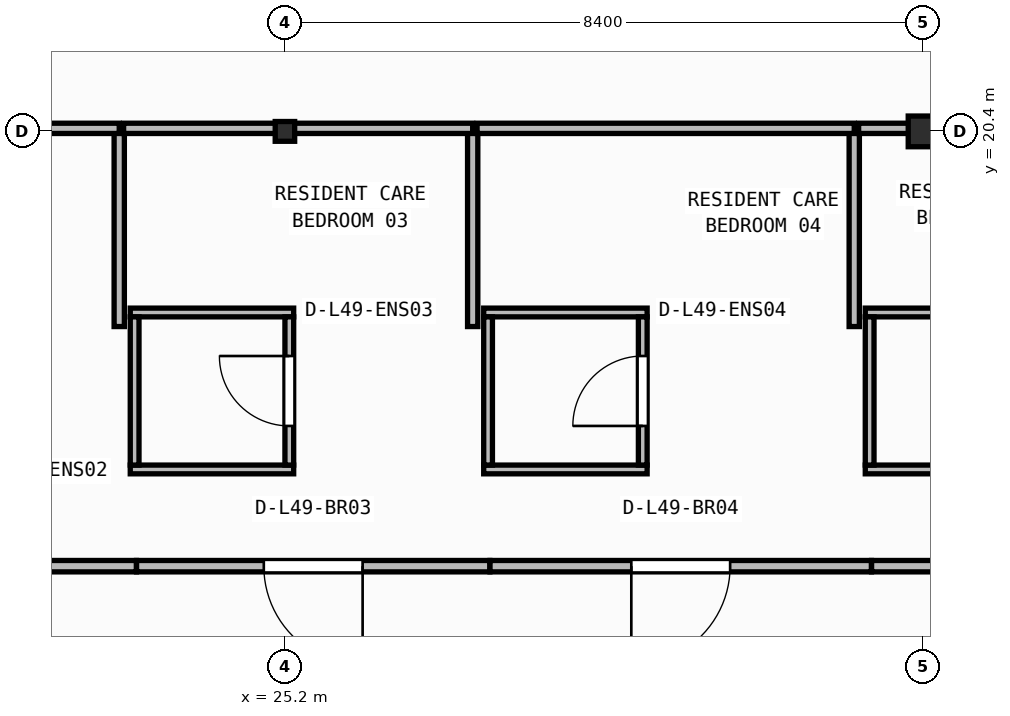
"""IFC4 building model, lengths in metres.
Left out: names, types, materials, properties, quantities, classifications, styles, units other than length and angle.
Written with IfcOpenShell. Run it as: python <this file> out.ifc"""

import sys

from ifc_helpers import new_model, si_unit, direction, frame, frame_2d, origin, origin_2d, place, context, subcontext, project, spatial, rectangle, i_section, extrude, element, fill, save


model = new_model("IFC4")
c1 = context("Model", 3, precision=1e-05, world=origin(), true_north=direction((0.0, 1.0)))
c2 = subcontext(c1, "Body", "Model", "MODEL_VIEW")
j1 = project(units=[si_unit("LENGTHUNIT", "METRE"), si_unit("PLANEANGLEUNIT", "RADIAN")], contexts=[c1])
p1 = place(None, origin())
s1 = spatial("IfcSite", under=j1, at=p1, CompositionType="ELEMENT")
p2 = place(p1, origin())
s2 = spatial("IfcBuilding", under=s1, at=p2, CompositionType="ELEMENT")
p3 = place(p2, frame((0.0, 0.0, 200.0)))
s3 = spatial("IfcBuildingStorey", under=s2, at=p3, CompositionType="ELEMENT", Elevation=200.0)
p4 = place(p3, frame((25.2, 20.4, 0.0), z_axis=(0.0, 0.0, 1.0), x_axis=(1.0, 0.0, 0.0)))
e1 = element("IfcColumn", 1, at=p4, inside=s3, PredefinedType="COLUMN", context=c2, shape_type="SweptSolid", body=[
    extrude(i_section(OverallWidth=0.256, OverallDepth=0.26, WebThickness=0.01, FlangeThickness=0.017, FilletRadius=0.013, at=origin_2d()), origin(), (0.0, 0.0, 1.0), 3.95),
])
p5 = place(p3, frame((33.6, 20.4, 0.0), z_axis=(0.0, 0.0, 1.0), x_axis=(1.0, 0.0, 0.0)))
e2 = element("IfcColumn", 2, at=p5, inside=s3, PredefinedType="COLUMN", context=c2, shape_type="SweptSolid", body=[
    extrude(i_section(OverallWidth=0.4, OverallDepth=0.404, WebThickness=0.02, FlangeThickness=0.032, at=origin_2d()), origin(), (0.0, 0.0, 1.0), 3.95),
])
p6 = place(p3, frame((23.165, 15.952, 0.0), z_axis=(0.0, 0.0, 1.0), x_axis=(1.0, 0.0, 0.0)))
e3 = element("IfcWall", 3, at=p6, inside=s3, PredefinedType="PARTITIONING", context=c2, shape_type="SweptSolid", body=[
    extrude(rectangle(XDim=2.15, YDim=0.115, at=frame_2d((1.075, 0.0))), origin(), (0.0, 0.0, 1.0), 3.429),
])
p7 = place(p3, frame((23.165, 18.018, 0.0), z_axis=(0.0, 0.0, 1.0), x_axis=(1.0, 0.0, 0.0)))
e4 = element("IfcWall", 4, at=p7, inside=s3, PredefinedType="PARTITIONING", context=c2, shape_type="SweptSolid", body=[
    extrude(rectangle(XDim=2.15, YDim=0.115, at=frame_2d((1.075, 0.0))), origin(), (0.0, 0.0, 1.0), 3.71),
])
p8 = place(p3, frame((23.222, 16.01, 0.0), z_axis=(0.0, 0.0, 1.0), x_axis=(0.0, 1.0, 0.0)))
e5 = element("IfcWall", 5, at=p8, inside=s3, PredefinedType="PARTITIONING", context=c2, shape_type="SweptSolid", body=[
    extrude(rectangle(XDim=1.95, YDim=0.115, at=frame_2d((0.975, 0.0))), origin(), (0.0, 0.0, 1.0), 3.71),
])
p9 = place(p3, frame((25.258, 16.01, 0.0), z_axis=(0.0, 0.0, 1.0), x_axis=(0.0, 1.0, 0.0)))
e6 = element("IfcWall", 6, at=p9, inside=s3, PredefinedType="PARTITIONING", context=c2, shape_type="SweptSolid", body=[
    extrude(rectangle(XDim=1.95, YDim=0.115, at=frame_2d((0.975, 0.0))), origin(), (0.0, 0.0, 1.0), 3.157),
])
p10 = place(p9, frame((0.515, 0.0, 0.0)))
e7 = element("IfcOpeningElement", 7, at=p10, cuts=e6, PredefinedType="OPENING", context=c2, shape_type="SweptSolid", body=[
    extrude(rectangle(XDim=0.92, YDim=2.1, at=frame_2d((0.46, 1.05))), frame((0.0, 0.067, 0.0), z_axis=(0.0, -1.0, 0.0), x_axis=(1.0, 0.0, 0.0)), (0.0, 0.0, 1.0), 0.135),
])
p11 = place(p3, frame((27.815, 15.952, 0.0), z_axis=(0.0, 0.0, 1.0), x_axis=(1.0, 0.0, 0.0)))
e8 = element("IfcWall", 8, at=p11, inside=s3, PredefinedType="PARTITIONING", context=c2, shape_type="SweptSolid", body=[
    extrude(rectangle(XDim=2.15, YDim=0.115, at=frame_2d((1.075, 0.0))), origin(), (0.0, 0.0, 1.0), 3.429),
])
p12 = place(p3, frame((27.815, 18.018, 0.0), z_axis=(0.0, 0.0, 1.0), x_axis=(1.0, 0.0, 0.0)))
e9 = element("IfcWall", 9, at=p12, inside=s3, PredefinedType="PARTITIONING", context=c2, shape_type="SweptSolid", body=[
    extrude(rectangle(XDim=2.15, YDim=0.115, at=frame_2d((1.075, 0.0))), origin(), (0.0, 0.0, 1.0), 3.71),
])
p13 = place(p3, frame((27.873, 16.01, 0.0), z_axis=(0.0, 0.0, 1.0), x_axis=(0.0, 1.0, 0.0)))
e10 = element("IfcWall", 10, at=p13, inside=s3, PredefinedType="PARTITIONING", context=c2, shape_type="SweptSolid", body=[
    extrude(rectangle(XDim=1.95, YDim=0.115, at=frame_2d((0.975, 0.0))), origin(), (0.0, 0.0, 1.0), 3.71),
])
p14 = place(p3, frame((29.907, 16.01, 0.0), z_axis=(0.0, 0.0, 1.0), x_axis=(0.0, 1.0, 0.0)))
e11 = element("IfcWall", 11, at=p14, inside=s3, PredefinedType="PARTITIONING", context=c2, shape_type="SweptSolid", body=[
    extrude(rectangle(XDim=1.95, YDim=0.115, at=frame_2d((0.975, 0.0))), origin(), (0.0, 0.0, 1.0), 3.71),
])
p15 = place(p14, frame((0.515, 0.0, 0.0)))
e12 = element("IfcOpeningElement", 12, at=p15, cuts=e11, PredefinedType="OPENING", context=c2, shape_type="SweptSolid", body=[
    extrude(rectangle(XDim=0.92, YDim=2.1, at=frame_2d((0.46, 1.05))), frame((0.0, 0.067, 0.0), z_axis=(0.0, -1.0, 0.0), x_axis=(1.0, 0.0, 0.0)), (0.0, 0.0, 1.0), 0.135),
])
p16 = place(p3, frame((32.835, 15.952, 0.0), z_axis=(0.0, 0.0, 1.0), x_axis=(1.0, 0.0, 0.0)))
e13 = element("IfcWall", 13, at=p16, inside=s3, PredefinedType="PARTITIONING", context=c2, shape_type="SweptSolid", body=[
    extrude(rectangle(XDim=2.15, YDim=0.115, at=frame_2d((1.075, 0.0))), origin(), (0.0, 0.0, 1.0), 3.429),
])
p17 = place(p3, frame((32.835, 18.018, 0.0), z_axis=(0.0, 0.0, 1.0), x_axis=(1.0, 0.0, 0.0)))
e14 = element("IfcWall", 14, at=p17, inside=s3, PredefinedType="PARTITIONING", context=c2, shape_type="SweptSolid", body=[
    extrude(rectangle(XDim=2.15, YDim=0.115, at=frame_2d((1.075, 0.0))), origin(), (0.0, 0.0, 1.0), 3.71),
])
p18 = place(p3, frame((32.893, 16.01, 0.0), z_axis=(0.0, 0.0, 1.0), x_axis=(0.0, 1.0, 0.0)))
e15 = element("IfcWall", 15, at=p18, inside=s3, PredefinedType="PARTITIONING", context=c2, shape_type="SweptSolid", body=[
    extrude(rectangle(XDim=1.95, YDim=0.115, at=frame_2d((0.975, 0.0))), origin(), (0.0, 0.0, 1.0), 3.71),
])
p19 = place(p3, frame((23.246, 14.68, 0.0), z_axis=(0.0, 0.0, 1.0), x_axis=(-1.0, 0.0, 0.0)))
e16 = element("IfcWall", 16, at=p19, inside=s3, PredefinedType="PARTITIONING", context=c2, shape_type="SweptSolid", body=[
    extrude(rectangle(XDim=4.278, YDim=0.15, at=frame_2d((2.139, 0.0))), origin(), (0.0, 0.0, 1.0), 3.71),
])
p20 = place(p19, frame((1.489, 0.0, 0.0)))
e17 = element("IfcOpeningElement", 17, at=p20, cuts=e16, PredefinedType="OPENING", context=c2, shape_type="SweptSolid", body=[
    extrude(rectangle(XDim=1.3, YDim=2.15, at=frame_2d((0.65, 1.075))), frame((0.0, 0.085, 0.0), z_axis=(0.0, -1.0, 0.0), x_axis=(1.0, 0.0, 0.0)), (0.0, 0.0, 1.0), 0.17),
])
p21 = place(p3, frame((27.896, 14.68, 0.0), z_axis=(0.0, 0.0, 1.0), x_axis=(-1.0, 0.0, 0.0)))
e18 = element("IfcWall", 18, at=p21, inside=s3, PredefinedType="PARTITIONING", context=c2, shape_type="SweptSolid", body=[
    extrude(rectangle(XDim=4.648, YDim=0.15, at=frame_2d((2.324, 0.0))), origin(), (0.0, 0.0, 1.0), 3.71),
])
p22 = place(p21, frame((1.674, 0.0, 0.0)))
e19 = element("IfcOpeningElement", 19, at=p22, cuts=e18, PredefinedType="OPENING", context=c2, shape_type="SweptSolid", body=[
    extrude(rectangle(XDim=1.3, YDim=2.15, at=frame_2d((0.65, 1.075))), frame((0.0, 0.085, 0.0), z_axis=(0.0, -1.0, 0.0), x_axis=(1.0, 0.0, 0.0)), (0.0, 0.0, 1.0), 0.17),
])
p23 = place(p3, frame((32.916, 14.68, 0.0), z_axis=(0.0, 0.0, 1.0), x_axis=(-1.0, 0.0, 0.0)))
e20 = element("IfcWall", 20, at=p23, inside=s3, PredefinedType="PARTITIONING", context=c2, shape_type="SweptSolid", body=[
    extrude(rectangle(XDim=5.018, YDim=0.15, at=frame_2d((2.509, 0.0))), origin(), (0.0, 0.0, 1.0), 3.71),
])
p24 = place(p23, frame((1.859, 0.0, 0.0)))
e21 = element("IfcOpeningElement", 21, at=p24, cuts=e20, PredefinedType="OPENING", context=c2, shape_type="SweptSolid", body=[
    extrude(rectangle(XDim=1.3, YDim=2.15, at=frame_2d((0.65, 1.075))), frame((0.0, 0.085, 0.0), z_axis=(0.0, -1.0, 0.0), x_axis=(1.0, 0.0, 0.0)), (0.0, 0.0, 1.0), 0.17),
])
p25 = place(p3, frame((37.196, 14.68, 0.0), z_axis=(0.0, 0.0, 1.0), x_axis=(-1.0, 0.0, 0.0)))
e22 = element("IfcWall", 22, at=p25, inside=s3, PredefinedType="PARTITIONING", context=c2, shape_type="SweptSolid", body=[
    extrude(rectangle(XDim=4.278, YDim=0.15, at=frame_2d((2.139, 0.0))), origin(), (0.0, 0.0, 1.0), 3.71),
])
p26 = place(p25, frame((1.489, 0.0, 0.0)))
e23 = element("IfcOpeningElement", 23, at=p26, cuts=e22, PredefinedType="OPENING", context=c2, shape_type="SweptSolid", body=[
    extrude(rectangle(XDim=1.3, YDim=2.15, at=frame_2d((0.65, 1.075))), frame((0.0, 0.085, 0.0), z_axis=(0.0, -1.0, 0.0), x_axis=(1.0, 0.0, 0.0)), (0.0, 0.0, 1.0), 0.17),
])
p27 = place(p3, frame((23.02, 17.833, 0.0), z_axis=(0.0, 0.0, 1.0), x_axis=(0.0, 1.0, 0.0)))
e24 = element("IfcWall", 24, at=p27, inside=s3, PredefinedType="PARTITIONING", context=c2, shape_type="SweptSolid", body=[
    extrude(rectangle(XDim=2.607, YDim=0.135, at=frame_2d((1.304, 0.0))), origin(), (0.0, 0.0, 1.0), 3.71),
])
p28 = place(p3, frame((23.02, 20.44, 0.0), z_axis=(0.0, 0.0, 1.0), x_axis=(-1.0, 0.0, 0.0)))
e25 = element("IfcWall", 25, at=p28, inside=s3, PredefinedType="PARTITIONING", context=c2, shape_type="SweptSolid", body=[
    extrude(rectangle(XDim=4.222, YDim=0.135, at=frame_2d((2.111, 0.0))), origin(), (0.0, 0.0, 1.0), 3.152),
])
p29 = place(p3, frame((27.67, 17.833, 0.0), z_axis=(0.0, 0.0, 1.0), x_axis=(0.0, 1.0, 0.0)))
e26 = element("IfcWall", 26, at=p29, inside=s3, PredefinedType="PARTITIONING", context=c2, shape_type="SweptSolid", body=[
    extrude(rectangle(XDim=2.607, YDim=0.135, at=frame_2d((1.304, 0.0))), origin(), (0.0, 0.0, 1.0), 3.71),
])
p30 = place(p3, frame((27.67, 20.44, 0.0), z_axis=(0.0, 0.0, 1.0), x_axis=(-1.0, 0.0, 0.0)))
e27 = element("IfcWall", 27, at=p30, inside=s3, PredefinedType="PARTITIONING", context=c2, shape_type="SweptSolid", body=[
    extrude(rectangle(XDim=4.593, YDim=0.135, at=frame_2d((2.296, 0.0))), origin(), (0.0, 0.0, 1.0), 3.152),
])
p31 = place(p3, frame((32.69, 17.833, 0.0), z_axis=(0.0, 0.0, 1.0), x_axis=(0.0, 1.0, 0.0)))
e28 = element("IfcWall", 28, at=p31, inside=s3, PredefinedType="PARTITIONING", context=c2, shape_type="SweptSolid", body=[
    extrude(rectangle(XDim=2.607, YDim=0.135, at=frame_2d((1.304, 0.0))), origin(), (0.0, 0.0, 1.0), 3.71),
])
p32 = place(p3, frame((32.69, 20.44, 0.0), z_axis=(0.0, 0.0, 1.0), x_axis=(-1.0, 0.0, 0.0)))
e29 = element("IfcWall", 29, at=p32, inside=s3, PredefinedType="PARTITIONING", context=c2, shape_type="SweptSolid", body=[
    extrude(rectangle(XDim=4.962, YDim=0.135, at=frame_2d((2.481, 0.0))), origin(), (0.0, 0.0, 1.0), 3.152),
])
p33 = place(p3, frame((36.913, 20.44, 0.0), z_axis=(0.0, 0.0, 1.0), x_axis=(-1.0, 0.0, 0.0)))
e30 = element("IfcWall", 30, at=p33, inside=s3, PredefinedType="PARTITIONING", context=c2, shape_type="SweptSolid", body=[
    extrude(rectangle(XDim=4.165, YDim=0.135, at=frame_2d((2.083, 0.0))), origin(), (0.0, 0.0, 1.0), 3.152),
])
p34 = place(p10, origin())
e31 = element("IfcDoor", 31, at=p34, inside=s3, OperationType="SINGLE_SWING_RIGHT", PredefinedType="DOOR", context=c2, shape_type="SweptSolid", body=[
    extrude(rectangle(XDim=0.92, YDim=2.1, at=frame_2d((0.46, 1.05))), frame((0.0, 0.025, 0.0), z_axis=(0.0, -1.0, 0.0), x_axis=(1.0, 0.0, 0.0)), (0.0, 0.0, 1.0), 0.05),
])
fill(e7, e31)
p35 = place(p15, origin())
e32 = element("IfcDoor", 32, at=p35, inside=s3, OperationType="SINGLE_SWING_LEFT", PredefinedType="DOOR", context=c2, shape_type="SweptSolid", body=[
    extrude(rectangle(XDim=0.92, YDim=2.1, at=frame_2d((0.46, 1.05))), frame((0.0, 0.025, 0.0), z_axis=(0.0, -1.0, 0.0), x_axis=(1.0, 0.0, 0.0)), (0.0, 0.0, 1.0), 0.05),
])
fill(e12, e32)
p36 = place(p22, origin())
e33 = element("IfcDoor", 33, at=p36, inside=s3, OperationType="SINGLE_SWING_LEFT", PredefinedType="DOOR", context=c2, shape_type="SweptSolid", body=[
    extrude(rectangle(XDim=1.3, YDim=2.15, at=frame_2d((0.65, 1.075))), frame((0.0, 0.025, 0.0), z_axis=(0.0, -1.0, 0.0), x_axis=(1.0, 0.0, 0.0)), (0.0, 0.0, 1.0), 0.05),
])
fill(e19, e33)
p37 = place(p24, origin())
e34 = element("IfcDoor", 34, at=p37, inside=s3, OperationType="SINGLE_SWING_RIGHT", PredefinedType="DOOR", context=c2, shape_type="SweptSolid", body=[
    extrude(rectangle(XDim=1.3, YDim=2.15, at=frame_2d((0.65, 1.075))), frame((0.0, 0.025, 0.0), z_axis=(0.0, -1.0, 0.0), x_axis=(1.0, 0.0, 0.0)), (0.0, 0.0, 1.0), 0.05),
])
fill(e21, e34)
save(model, sys.argv[1])
